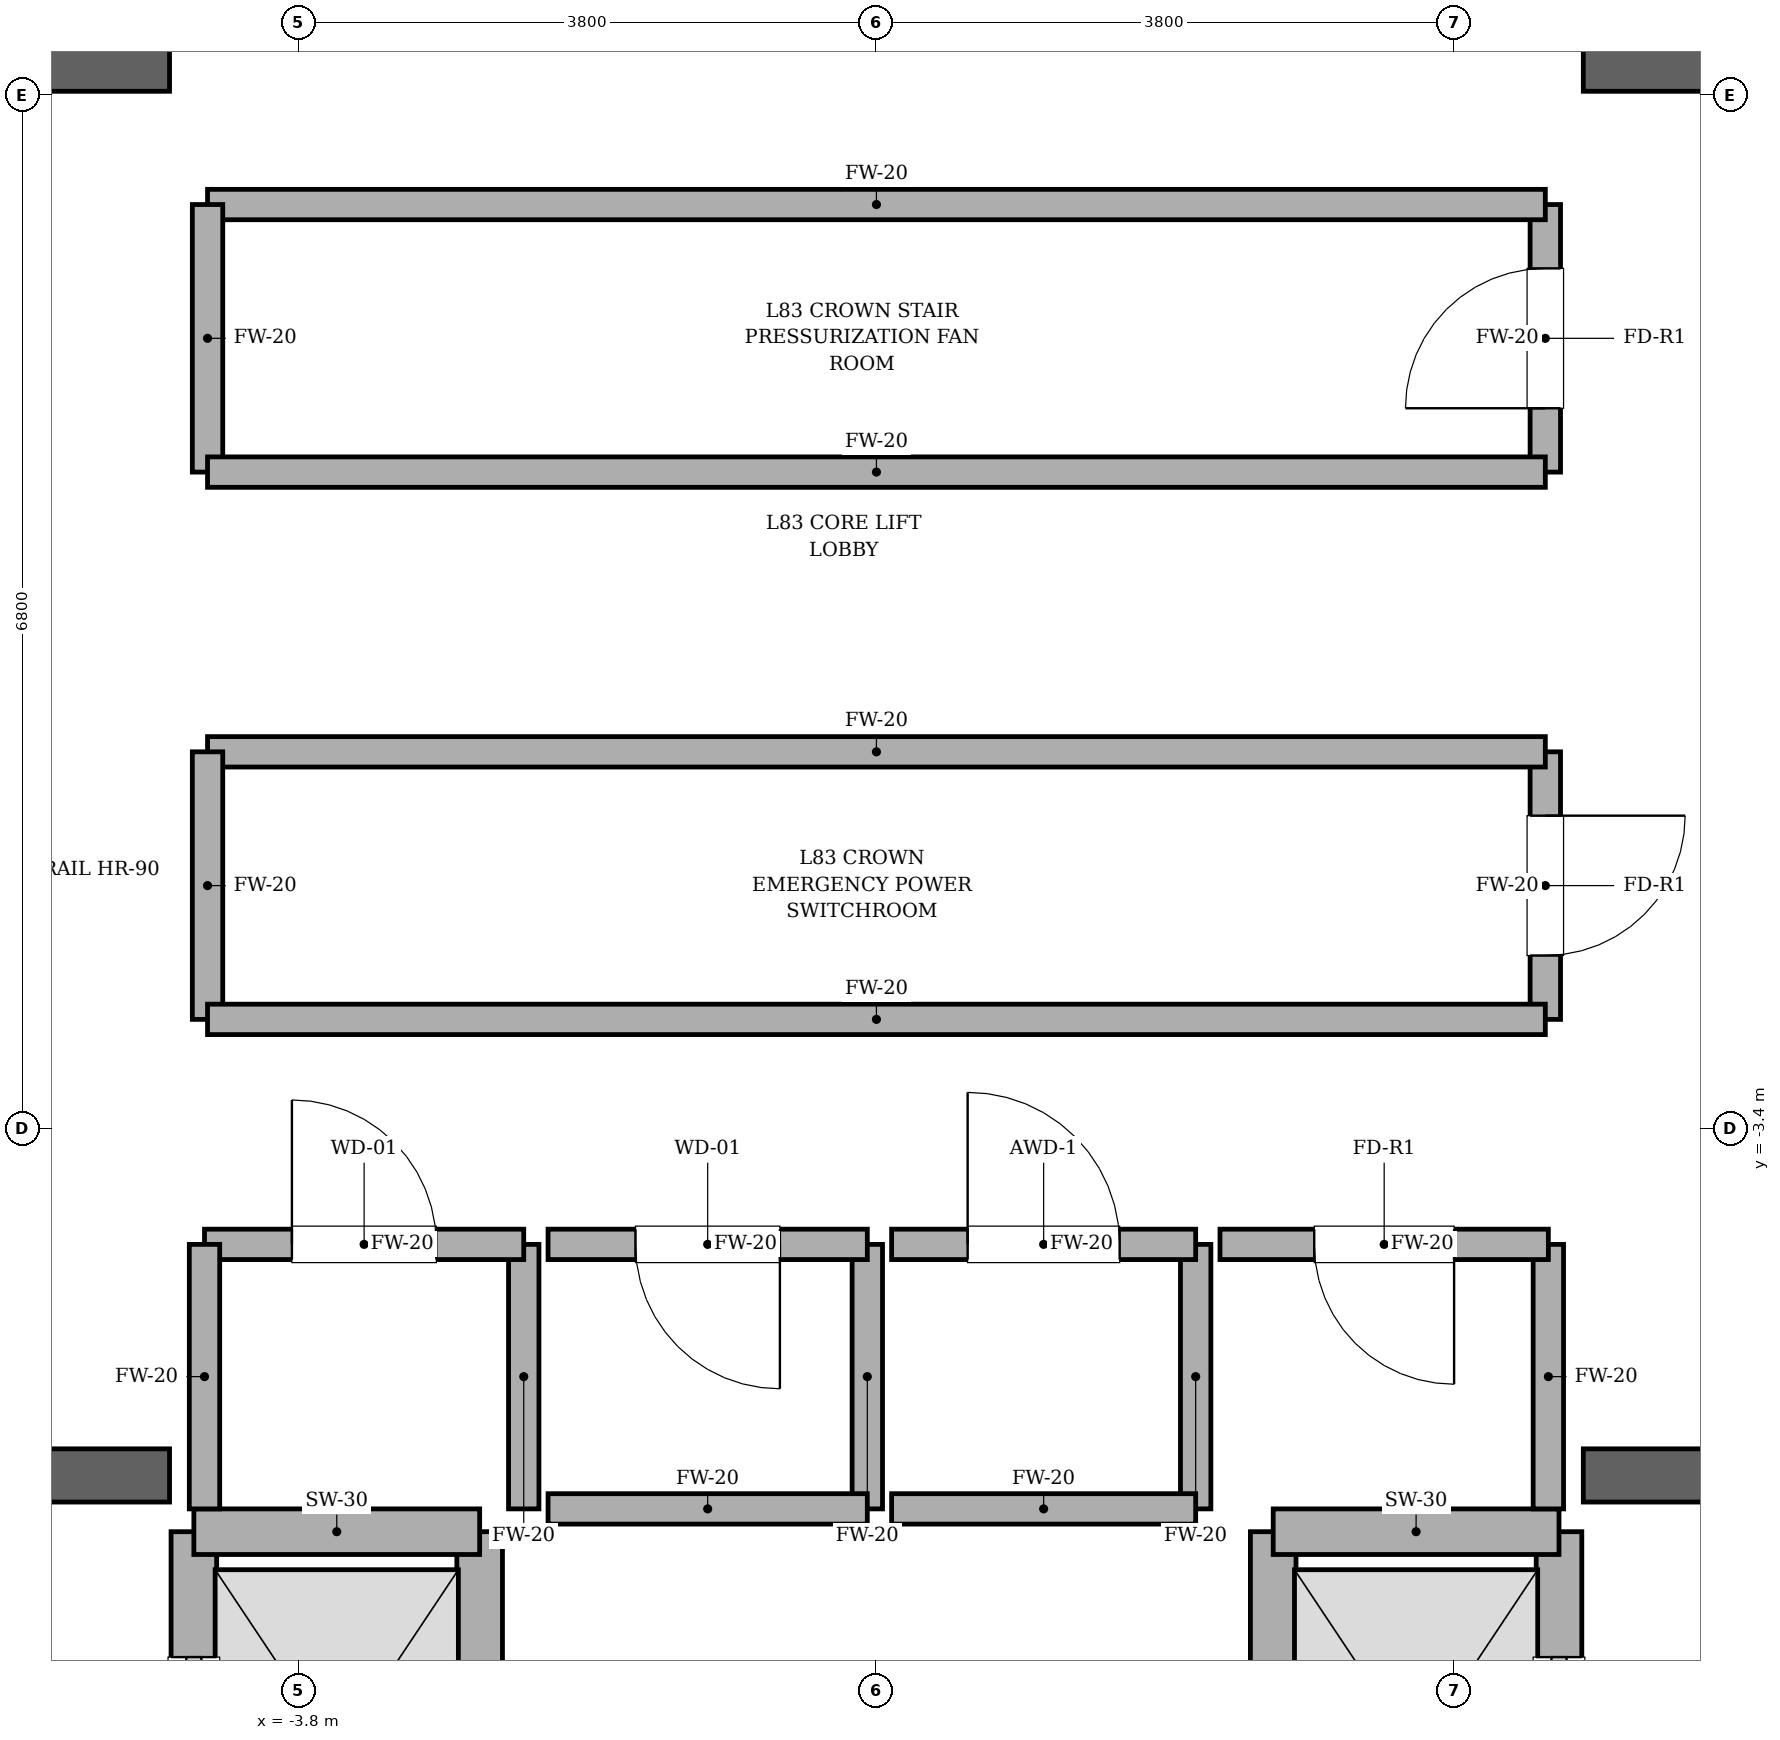
"""IFC4 building model, lengths in metres.
Left out: names, types, materials, properties, quantities, classifications, styles, units other than length and angle.
Written with IfcOpenShell. Run it as: python <this file> out.ifc"""

import sys

from ifc_helpers import new_model, si_unit, direction, frame, frame_2d, origin, place, context, subcontext, project, spatial, rectangle, extrude, element, fill, save


model = new_model("IFC4")
c1 = context("Model", 3, precision=1e-05, world=origin(), true_north=direction((0.0, 1.0)))
c2 = subcontext(c1, "Body", "Model", "MODEL_VIEW")
j1 = project(units=[si_unit("LENGTHUNIT", "METRE"), si_unit("PLANEANGLEUNIT", "RADIAN")], contexts=[c1])
p1 = place(None, origin())
s1 = spatial("IfcSite", under=j1, at=p1, CompositionType="ELEMENT")
p2 = place(p1, origin())
s2 = spatial("IfcBuilding", under=s1, at=p2, CompositionType="ELEMENT")
p3 = place(p2, frame((0.0, 0.0, 352.8)))
s3 = spatial("IfcBuildingStorey", under=s2, at=p3, CompositionType="ELEMENT", Elevation=352.8)
p4 = place(p3, frame((-9.975, -5.68, 0.0), z_axis=(0.0, 0.0, 1.0), x_axis=(1.0, 0.0, 0.0)))
e1 = element("IfcWall", 1, at=p4, inside=s3, PredefinedType="SOLIDWALL", context=c2, shape_type="SweptSolid", body=[
    extrude(rectangle(XDim=5.325, YDim=0.35, at=frame_2d((2.663, 0.0))), origin(), (0.0, 0.0, 1.0), 4.5),
])
p5 = place(p4, frame((1.435, 0.0, 0.0)))
e2 = element("IfcOpeningElement", 2, at=p5, cuts=e1, PredefinedType="OPENING", context=c2, shape_type="SweptSolid", body=[
    extrude(rectangle(XDim=1.18, YDim=2.2, at=frame_2d((0.59, 1.1))), frame((0.0, 0.185, 0.0), z_axis=(0.0, -1.0, 0.0), x_axis=(1.0, 0.0, 0.0)), (0.0, 0.0, 1.0), 0.37),
])
p6 = place(p3, frame((4.65, -5.68, 0.0), z_axis=(0.0, 0.0, 1.0), x_axis=(1.0, 0.0, 0.0)))
e3 = element("IfcWall", 3, at=p6, inside=s3, PredefinedType="SOLIDWALL", context=c2, shape_type="SweptSolid", body=[
    extrude(rectangle(XDim=5.325, YDim=0.35, at=frame_2d((2.663, 0.0))), origin(), (0.0, 0.0, 1.0), 4.5),
])
p7 = place(p6, frame((2.71, 0.0, 0.0)))
e4 = element("IfcOpeningElement", 4, at=p7, cuts=e3, PredefinedType="OPENING", context=c2, shape_type="SweptSolid", body=[
    extrude(rectangle(XDim=1.18, YDim=2.2, at=frame_2d((0.59, 1.1))), frame((0.0, 0.185, 0.0), z_axis=(0.0, -1.0, 0.0), x_axis=(1.0, 0.0, 0.0)), (0.0, 0.0, 1.0), 0.37),
])
for number, where, z_axis, x_axis in (
    (5, (-9.975, 3.6, 0.0), (0.0, 0.0, 1.0), (1.0, 0.0, 0.0)),
    (6, (4.65, 3.6, 0.0), (0.0, 0.0, 1.0), (1.0, 0.0, 0.0)),
):
    element("IfcWall", number, at=place(p3, frame(where, z_axis=z_axis, x_axis=x_axis)), inside=s3, PredefinedType="SOLIDWALL", context=c2, shape_type="SweptSolid", body=[
        extrude(rectangle(XDim=5.325, YDim=0.35, at=frame_2d((2.663, 0.0))), origin(), (0.0, 0.0, 1.0), 4.5),
    ])
p8 = place(p3, frame((-4.49, -8.82, 0.0), z_axis=(0.0, 0.0, 1.0), x_axis=(0.0, 1.0, 0.0)))
e7 = element("IfcWall", 7, at=p8, inside=s3, PredefinedType="SOLIDWALL", context=c2, shape_type="SweptSolid", body=[
    extrude(rectangle(XDim=2.77, YDim=0.3, at=frame_2d((1.385, 0.0))), origin(), (0.0, 0.0, 1.0), 4.28),
])
p9 = place(p8, frame((0.825, 0.0, 0.0)))
e8 = element("IfcOpeningElement", 8, at=p9, cuts=e7, PredefinedType="OPENING", context=c2, shape_type="SweptSolid", body=[
    extrude(rectangle(XDim=1.12, YDim=2.25, at=frame_2d((0.56, 1.125))), frame((0.0, 0.16, 0.0), z_axis=(0.0, -1.0, 0.0), x_axis=(1.0, 0.0, 0.0)), (0.0, 0.0, 1.0), 0.32),
])
p10 = place(p3, frame((-2.61, -8.82, 0.0), z_axis=(0.0, 0.0, 1.0), x_axis=(0.0, 1.0, 0.0)))
e9 = element("IfcWall", 9, at=p10, inside=s3, PredefinedType="SOLIDWALL", context=c2, shape_type="SweptSolid", body=[
    extrude(rectangle(XDim=2.77, YDim=0.3, at=frame_2d((1.385, 0.0))), origin(), (0.0, 0.0, 1.0), 4.28),
])
p11 = place(p3, frame((-4.49, -6.05, 0.0), z_axis=(0.0, 0.0, 1.0), x_axis=(1.0, 0.0, 0.0)))
e10 = element("IfcWall", 10, at=p11, inside=s3, PredefinedType="SOLIDWALL", context=c2, shape_type="SweptSolid", body=[
    extrude(rectangle(XDim=1.88, YDim=0.3, at=frame_2d((0.94, 0.0))), origin(), (0.0, 0.0, 1.0), 4.28),
])
p12 = place(p3, frame((4.49, -8.82, 0.0), z_axis=(0.0, 0.0, 1.0), x_axis=(0.0, 1.0, 0.0)))
e11 = element("IfcWall", 11, at=p12, inside=s3, PredefinedType="SOLIDWALL", context=c2, shape_type="SweptSolid", body=[
    extrude(rectangle(XDim=2.77, YDim=0.3, at=frame_2d((1.385, 0.0))), origin(), (0.0, 0.0, 1.0), 4.28),
])
p13 = place(p12, frame((0.825, 0.0, 0.0)))
e12 = element("IfcOpeningElement", 12, at=p13, cuts=e11, PredefinedType="OPENING", context=c2, shape_type="SweptSolid", body=[
    extrude(rectangle(XDim=1.12, YDim=2.25, at=frame_2d((0.56, 1.125))), frame((0.0, 0.16, 0.0), z_axis=(0.0, -1.0, 0.0), x_axis=(1.0, 0.0, 0.0)), (0.0, 0.0, 1.0), 0.32),
])
p14 = place(p3, frame((2.61, -8.82, 0.0), z_axis=(0.0, 0.0, 1.0), x_axis=(0.0, 1.0, 0.0)))
e13 = element("IfcWall", 13, at=p14, inside=s3, PredefinedType="SOLIDWALL", context=c2, shape_type="SweptSolid", body=[
    extrude(rectangle(XDim=2.77, YDim=0.3, at=frame_2d((1.385, 0.0))), origin(), (0.0, 0.0, 1.0), 4.28),
])
p15 = place(p3, frame((2.61, -6.05, 0.0), z_axis=(0.0, 0.0, 1.0), x_axis=(1.0, 0.0, 0.0)))
e14 = element("IfcWall", 14, at=p15, inside=s3, PredefinedType="SOLIDWALL", context=c2, shape_type="SweptSolid", body=[
    extrude(rectangle(XDim=1.88, YDim=0.3, at=frame_2d((0.94, 0.0))), origin(), (0.0, 0.0, 1.0), 4.28),
])
p16 = place(p3, frame((-2.32, -5.9, 0.0), z_axis=(0.0, 0.0, 1.0), x_axis=(0.0, 1.0, 0.0)))
e15 = element("IfcWall", 15, at=p16, inside=s3, PredefinedType="SOLIDWALL", context=c2, shape_type="SweptSolid", body=[
    extrude(rectangle(XDim=1.74, YDim=0.2, at=frame_2d((0.87, 0.0))), origin(), (0.0, 0.0, 1.0), 4.28),
])
p17 = place(p3, frame((-2.32, -4.16, 0.0), z_axis=(0.0, 0.0, 1.0), x_axis=(-1.0, 0.0, 0.0)))
e16 = element("IfcWall", 16, at=p17, inside=s3, PredefinedType="SOLIDWALL", context=c2, shape_type="SweptSolid", body=[
    extrude(rectangle(XDim=2.1, YDim=0.2, at=frame_2d((1.05, 0.0))), origin(), (0.0, 0.0, 1.0), 4.28),
])
p18 = place(p17, frame((0.575, 0.0, 0.0)))
e17 = element("IfcOpeningElement", 17, at=p18, cuts=e16, PredefinedType="OPENING", context=c2, shape_type="SweptSolid", body=[
    extrude(rectangle(XDim=0.95, YDim=2.15, at=frame_2d((0.475, 1.075))), frame((0.0, 0.11, 0.0), z_axis=(0.0, -1.0, 0.0), x_axis=(1.0, 0.0, 0.0)), (0.0, 0.0, 1.0), 0.22),
])
for number, where, z_axis, x_axis in (
    (18, (-4.42, -4.16, 0.0), (0.0, 0.0, 1.0), (0.0, -1.0, 0.0)),
    (19, (-0.06, -5.9, 0.0), (0.0, 0.0, 1.0), (0.0, 1.0, 0.0)),
):
    element("IfcWall", number, at=place(p3, frame(where, z_axis=z_axis, x_axis=x_axis)), inside=s3, PredefinedType="SOLIDWALL", context=c2, shape_type="SweptSolid", body=[
        extrude(rectangle(XDim=1.74, YDim=0.2, at=frame_2d((0.87, 0.0))), origin(), (0.0, 0.0, 1.0), 4.28),
    ])
p19 = place(p3, frame((-0.06, -4.16, 0.0), z_axis=(0.0, 0.0, 1.0), x_axis=(-1.0, 0.0, 0.0)))
e20 = element("IfcWall", 20, at=p19, inside=s3, PredefinedType="SOLIDWALL", context=c2, shape_type="SweptSolid", body=[
    extrude(rectangle(XDim=2.1, YDim=0.2, at=frame_2d((1.05, 0.0))), origin(), (0.0, 0.0, 1.0), 4.28),
])
p20 = place(p19, frame((0.575, 0.0, 0.0)))
e21 = element("IfcOpeningElement", 21, at=p20, cuts=e20, PredefinedType="OPENING", context=c2, shape_type="SweptSolid", body=[
    extrude(rectangle(XDim=0.95, YDim=2.15, at=frame_2d((0.475, 1.075))), frame((0.0, 0.11, 0.0), z_axis=(0.0, -1.0, 0.0), x_axis=(1.0, 0.0, 0.0)), (0.0, 0.0, 1.0), 0.22),
])
p21 = place(p3, frame((-2.16, -5.9, 0.0), z_axis=(0.0, 0.0, 1.0), x_axis=(1.0, 0.0, 0.0)))
e22 = element("IfcWall", 22, at=p21, inside=s3, PredefinedType="SOLIDWALL", context=c2, shape_type="SweptSolid", body=[
    extrude(rectangle(XDim=2.1, YDim=0.2, at=frame_2d((1.05, 0.0))), origin(), (0.0, 0.0, 1.0), 4.28),
])
p22 = place(p3, frame((2.1, -5.9, 0.0), z_axis=(0.0, 0.0, 1.0), x_axis=(0.0, 1.0, 0.0)))
e23 = element("IfcWall", 23, at=p22, inside=s3, PredefinedType="SOLIDWALL", context=c2, shape_type="SweptSolid", body=[
    extrude(rectangle(XDim=1.74, YDim=0.2, at=frame_2d((0.87, 0.0))), origin(), (0.0, 0.0, 1.0), 4.28),
])
p23 = place(p3, frame((2.1, -4.16, 0.0), z_axis=(0.0, 0.0, 1.0), x_axis=(-1.0, 0.0, 0.0)))
e24 = element("IfcWall", 24, at=p23, inside=s3, PredefinedType="SOLIDWALL", context=c2, shape_type="SweptSolid", body=[
    extrude(rectangle(XDim=2.0, YDim=0.2, at=frame_2d((1.0, 0.0))), origin(), (0.0, 0.0, 1.0), 4.28),
])
p24 = place(p23, frame((0.5, 0.0, 0.0)))
e25 = element("IfcOpeningElement", 25, at=p24, cuts=e24, PredefinedType="OPENING", context=c2, shape_type="SweptSolid", body=[
    extrude(rectangle(XDim=1.0, YDim=2.15, at=frame_2d((0.5, 1.075))), frame((0.0, 0.11, 0.0), z_axis=(0.0, -1.0, 0.0), x_axis=(1.0, 0.0, 0.0)), (0.0, 0.0, 1.0), 0.22),
])
p25 = place(p3, frame((0.1, -5.9, 0.0), z_axis=(0.0, 0.0, 1.0), x_axis=(1.0, 0.0, 0.0)))
e26 = element("IfcWall", 26, at=p25, inside=s3, PredefinedType="SOLIDWALL", context=c2, shape_type="SweptSolid", body=[
    extrude(rectangle(XDim=2.0, YDim=0.2, at=frame_2d((1.0, 0.0))), origin(), (0.0, 0.0, 1.0), 4.28),
])
p26 = place(p3, frame((4.42, -5.9, 0.0), z_axis=(0.0, 0.0, 1.0), x_axis=(0.0, 1.0, 0.0)))
e27 = element("IfcWall", 27, at=p26, inside=s3, PredefinedType="SOLIDWALL", context=c2, shape_type="SweptSolid", body=[
    extrude(rectangle(XDim=1.74, YDim=0.2, at=frame_2d((0.87, 0.0))), origin(), (0.0, 0.0, 1.0), 4.28),
])
p27 = place(p3, frame((4.42, -4.16, 0.0), z_axis=(0.0, 0.0, 1.0), x_axis=(-1.0, 0.0, 0.0)))
e28 = element("IfcWall", 28, at=p27, inside=s3, PredefinedType="SOLIDWALL", context=c2, shape_type="SweptSolid", body=[
    extrude(rectangle(XDim=2.16, YDim=0.2, at=frame_2d((1.08, 0.0))), origin(), (0.0, 0.0, 1.0), 4.28),
])
p28 = place(p27, frame((0.62, 0.0, 0.0)))
e29 = element("IfcOpeningElement", 29, at=p28, cuts=e28, PredefinedType="OPENING", context=c2, shape_type="SweptSolid", body=[
    extrude(rectangle(XDim=0.92, YDim=2.1, at=frame_2d((0.46, 1.05))), frame((0.0, 0.11, 0.0), z_axis=(0.0, -1.0, 0.0), x_axis=(1.0, 0.0, 0.0)), (0.0, 0.0, 1.0), 0.22),
])
p29 = place(p3, frame((4.4, -2.68, 0.0), z_axis=(0.0, 0.0, 1.0), x_axis=(0.0, 1.0, 0.0)))
e30 = element("IfcWall", 30, at=p29, inside=s3, PredefinedType="SOLIDWALL", context=c2, shape_type="SweptSolid", body=[
    extrude(rectangle(XDim=1.76, YDim=0.2, at=frame_2d((0.88, 0.0))), origin(), (0.0, 0.0, 1.0), 4.28),
])
p30 = place(p29, frame((0.42, 0.0, 0.0)))
e31 = element("IfcOpeningElement", 31, at=p30, cuts=e30, PredefinedType="OPENING", context=c2, shape_type="SweptSolid", body=[
    extrude(rectangle(XDim=0.92, YDim=2.1, at=frame_2d((0.46, 1.05))), frame((0.0, 0.11, 0.0), z_axis=(0.0, -1.0, 0.0), x_axis=(1.0, 0.0, 0.0)), (0.0, 0.0, 1.0), 0.22),
])
p31 = place(p3, frame((4.4, -0.92, 0.0), z_axis=(0.0, 0.0, 1.0), x_axis=(-1.0, 0.0, 0.0)))
e32 = element("IfcWall", 32, at=p31, inside=s3, PredefinedType="SOLIDWALL", context=c2, shape_type="SweptSolid", body=[
    extrude(rectangle(XDim=8.8, YDim=0.2, at=frame_2d((4.4, 0.0))), origin(), (0.0, 0.0, 1.0), 4.28),
])
p32 = place(p3, frame((-4.4, -0.92, 0.0), z_axis=(0.0, 0.0, 1.0), x_axis=(0.0, -1.0, 0.0)))
e33 = element("IfcWall", 33, at=p32, inside=s3, PredefinedType="SOLIDWALL", context=c2, shape_type="SweptSolid", body=[
    extrude(rectangle(XDim=1.76, YDim=0.2, at=frame_2d((0.88, 0.0))), origin(), (0.0, 0.0, 1.0), 4.28),
])
p33 = place(p3, frame((-4.4, -2.68, 0.0), z_axis=(0.0, 0.0, 1.0), x_axis=(1.0, 0.0, 0.0)))
e34 = element("IfcWall", 34, at=p33, inside=s3, PredefinedType="SOLIDWALL", context=c2, shape_type="SweptSolid", body=[
    extrude(rectangle(XDim=8.8, YDim=0.2, at=frame_2d((4.4, 0.0))), origin(), (0.0, 0.0, 1.0), 4.28),
])
p34 = place(p3, frame((4.4, 0.92, 0.0), z_axis=(0.0, 0.0, 1.0), x_axis=(0.0, 1.0, 0.0)))
e35 = element("IfcWall", 35, at=p34, inside=s3, PredefinedType="SOLIDWALL", context=c2, shape_type="SweptSolid", body=[
    extrude(rectangle(XDim=1.76, YDim=0.2, at=frame_2d((0.88, 0.0))), origin(), (0.0, 0.0, 1.0), 4.28),
])
p35 = place(p34, frame((0.42, 0.0, 0.0)))
e36 = element("IfcOpeningElement", 36, at=p35, cuts=e35, PredefinedType="OPENING", context=c2, shape_type="SweptSolid", body=[
    extrude(rectangle(XDim=0.92, YDim=2.1, at=frame_2d((0.46, 1.05))), frame((0.0, 0.11, 0.0), z_axis=(0.0, -1.0, 0.0), x_axis=(1.0, 0.0, 0.0)), (0.0, 0.0, 1.0), 0.22),
])
p36 = place(p3, frame((4.4, 2.68, 0.0), z_axis=(0.0, 0.0, 1.0), x_axis=(-1.0, 0.0, 0.0)))
e37 = element("IfcWall", 37, at=p36, inside=s3, PredefinedType="SOLIDWALL", context=c2, shape_type="SweptSolid", body=[
    extrude(rectangle(XDim=8.8, YDim=0.2, at=frame_2d((4.4, 0.0))), origin(), (0.0, 0.0, 1.0), 4.28),
])
p37 = place(p3, frame((-4.4, 2.68, 0.0), z_axis=(0.0, 0.0, 1.0), x_axis=(0.0, -1.0, 0.0)))
e38 = element("IfcWall", 38, at=p37, inside=s3, PredefinedType="SOLIDWALL", context=c2, shape_type="SweptSolid", body=[
    extrude(rectangle(XDim=1.76, YDim=0.2, at=frame_2d((0.88, 0.0))), origin(), (0.0, 0.0, 1.0), 4.28),
])
p38 = place(p3, frame((-4.4, 0.92, 0.0), z_axis=(0.0, 0.0, 1.0), x_axis=(1.0, 0.0, 0.0)))
e39 = element("IfcWall", 39, at=p38, inside=s3, PredefinedType="SOLIDWALL", context=c2, shape_type="SweptSolid", body=[
    extrude(rectangle(XDim=8.8, YDim=0.2, at=frame_2d((4.4, 0.0))), origin(), (0.0, 0.0, 1.0), 4.28),
])
p39 = place(p9, origin())
e40 = element("IfcDoor", 40, at=p39, inside=s3, OperationType="SLIDING_TO_LEFT", PredefinedType="DOOR", context=c2, shape_type="SweptSolid", body=[
    extrude(rectangle(XDim=1.12, YDim=2.25, at=frame_2d((0.56, 1.125))), frame((0.0, 0.025, 0.0), z_axis=(0.0, -1.0, 0.0), x_axis=(1.0, 0.0, 0.0)), (0.0, 0.0, 1.0), 0.05),
])
fill(e8, e40)
p40 = place(p13, origin())
e41 = element("IfcDoor", 41, at=p40, inside=s3, OperationType="SLIDING_TO_RIGHT", PredefinedType="DOOR", context=c2, shape_type="SweptSolid", body=[
    extrude(rectangle(XDim=1.12, YDim=2.25, at=frame_2d((0.56, 1.125))), frame((0.0, 0.025, 0.0), z_axis=(0.0, -1.0, 0.0), x_axis=(1.0, 0.0, 0.0)), (0.0, 0.0, 1.0), 0.05),
])
fill(e12, e41)
p41 = place(p18, origin())
e42 = element("IfcDoor", 42, at=p41, inside=s3, OperationType="SINGLE_SWING_RIGHT", PredefinedType="DOOR", context=c2, shape_type="SweptSolid", body=[
    extrude(rectangle(XDim=0.95, YDim=2.15, at=frame_2d((0.475, 1.075))), frame((0.0, 0.025, 0.0), z_axis=(0.0, -1.0, 0.0), x_axis=(1.0, 0.0, 0.0)), (0.0, 0.0, 1.0), 0.05),
])
fill(e17, e42)
p42 = place(p20, origin())
e43 = element("IfcDoor", 43, at=p42, inside=s3, OperationType="SINGLE_SWING_LEFT", PredefinedType="DOOR", context=c2, shape_type="SweptSolid", body=[
    extrude(rectangle(XDim=0.95, YDim=2.15, at=frame_2d((0.475, 1.075))), frame((0.0, 0.025, 0.0), z_axis=(0.0, -1.0, 0.0), x_axis=(1.0, 0.0, 0.0)), (0.0, 0.0, 1.0), 0.05),
])
fill(e21, e43)
p43 = place(p24, origin())
e44 = element("IfcDoor", 44, at=p43, inside=s3, OperationType="SINGLE_SWING_RIGHT", PredefinedType="DOOR", context=c2, shape_type="SweptSolid", body=[
    extrude(rectangle(XDim=1.0, YDim=2.15, at=frame_2d((0.5, 1.075))), frame((0.0, 0.025, 0.0), z_axis=(0.0, -1.0, 0.0), x_axis=(1.0, 0.0, 0.0)), (0.0, 0.0, 1.0), 0.05),
])
fill(e25, e44)
p44 = place(p28, origin())
e45 = element("IfcDoor", 45, at=p44, inside=s3, OperationType="SINGLE_SWING_LEFT", PredefinedType="DOOR", context=c2, shape_type="SweptSolid", body=[
    extrude(rectangle(XDim=0.92, YDim=2.1, at=frame_2d((0.46, 1.05))), frame((0.0, 0.025, 0.0), z_axis=(0.0, -1.0, 0.0), x_axis=(1.0, 0.0, 0.0)), (0.0, 0.0, 1.0), 0.05),
])
fill(e29, e45)
p45 = place(p30, origin())
e46 = element("IfcDoor", 46, at=p45, inside=s3, OperationType="SINGLE_SWING_RIGHT", PredefinedType="DOOR", context=c2, shape_type="SweptSolid", body=[
    extrude(rectangle(XDim=0.92, YDim=2.1, at=frame_2d((0.46, 1.05))), frame((0.0, 0.025, 0.0), z_axis=(0.0, -1.0, 0.0), x_axis=(1.0, 0.0, 0.0)), (0.0, 0.0, 1.0), 0.05),
])
fill(e31, e46)
p46 = place(p35, origin())
e47 = element("IfcDoor", 47, at=p46, inside=s3, OperationType="SINGLE_SWING_LEFT", PredefinedType="DOOR", context=c2, shape_type="SweptSolid", body=[
    extrude(rectangle(XDim=0.92, YDim=2.1, at=frame_2d((0.46, 1.05))), frame((0.0, 0.025, 0.0), z_axis=(0.0, -1.0, 0.0), x_axis=(1.0, 0.0, 0.0)), (0.0, 0.0, 1.0), 0.05),
])
fill(e36, e47)
save(model, sys.argv[1])
